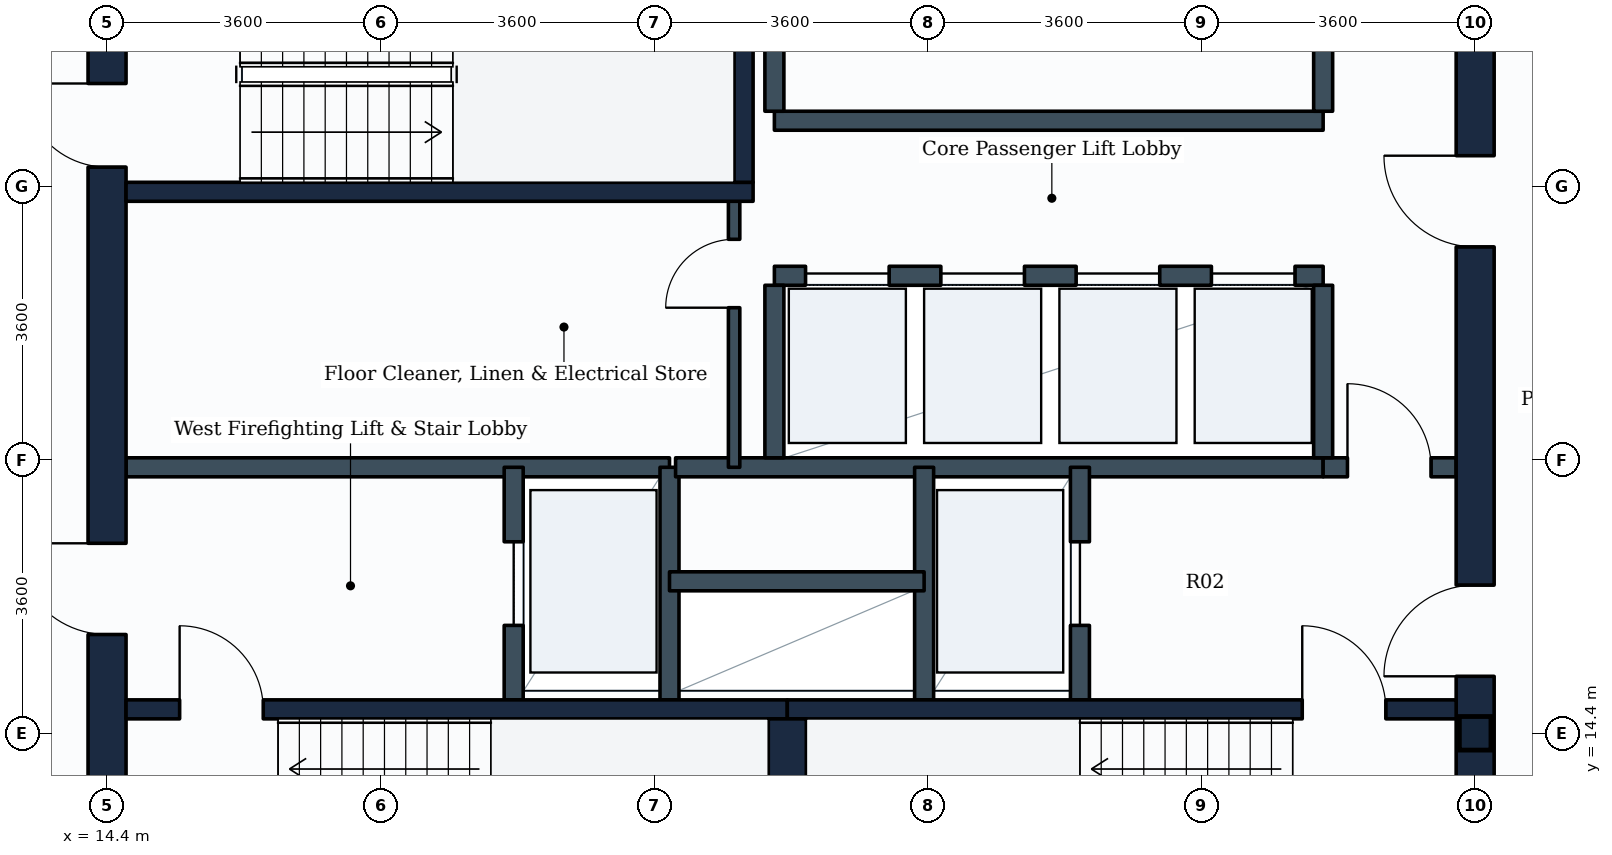
"""IFC4 building model, lengths in metres.
Left out: names, types, materials, properties, quantities, classifications, styles, units other than length and angle.
Written with IfcOpenShell. Run it as: python <this file> out.ifc"""

import sys

from ifc_helpers import new_model, si_unit, direction, frame, frame_2d, origin, origin_2d, place, context, subcontext, project, spatial, rectangle, i_section, extrude, element, fill, save


model = new_model("IFC4")
c1 = context("Model", 3, precision=1e-05, world=origin(), true_north=direction((0.0, 1.0)))
c2 = subcontext(c1, "Body", "Model", "MODEL_VIEW")
j1 = project(units=[si_unit("LENGTHUNIT", "METRE"), si_unit("PLANEANGLEUNIT", "RADIAN")], contexts=[c1])
p1 = place(None, origin())
s1 = spatial("IfcSite", under=j1, at=p1, CompositionType="ELEMENT")
p2 = place(p1, origin())
s2 = spatial("IfcBuilding", under=s1, at=p2, CompositionType="ELEMENT")
p3 = place(p2, frame((0.0, 0.0, 205.2)))
s3 = spatial("IfcBuildingStorey", under=s2, at=p3, CompositionType="ELEMENT", Elevation=205.2)
p4 = place(p3, frame((32.4, 14.4, 0.0), z_axis=(0.0, 0.0, 1.0), x_axis=(1.0, 0.0, 0.0)))
e1 = element("IfcColumn", 1, at=p4, inside=s3, PredefinedType="COLUMN", context=c2, shape_type="SweptSolid", body=[
    extrude(i_section(OverallWidth=0.416, OverallDepth=0.442, WebThickness=0.025, FlangeThickness=0.041, FilletRadius=0.015, at=origin_2d()), origin(), (0.0, 0.0, 1.0), 3.8),
])
p5 = place(p3, frame((14.4, 10.8, 0.0), z_axis=(0.0, 0.0, 1.0), x_axis=(0.0, 1.0, 0.0)))
e2 = element("IfcWall", 2, at=p5, inside=s3, PredefinedType="SHEAR", context=c2, shape_type="SweptSolid", body=[
    extrude(rectangle(XDim=14.4, YDim=0.5, at=frame_2d((7.2, 0.0))), origin(), (0.0, 0.0, 1.0), 3.48),
])
p6 = place(p5, frame((11.05, 0.0, 0.0)))
e3 = element("IfcOpeningElement", 3, at=p6, cuts=e2, PredefinedType="OPENING", context=c2, shape_type="SweptSolid", body=[
    extrude(rectangle(XDim=1.1, YDim=2.1, at=frame_2d((0.55, 1.05))), frame((0.0, 0.26, 0.0), z_axis=(0.0, -1.0, 0.0), x_axis=(1.0, 0.0, 0.0)), (0.0, 0.0, 1.0), 0.52),
])
p7 = place(p5, frame((4.9, 0.0, 0.0)))
e4 = element("IfcOpeningElement", 4, at=p7, cuts=e2, PredefinedType="OPENING", context=c2, shape_type="SweptSolid", body=[
    extrude(rectangle(XDim=1.2, YDim=2.1, at=frame_2d((0.6, 1.05))), frame((0.0, 0.26, 0.0), z_axis=(0.0, -1.0, 0.0), x_axis=(1.0, 0.0, 0.0)), (0.0, 0.0, 1.0), 0.52),
])
p8 = place(p3, frame((32.4, 10.8, 0.0), z_axis=(0.0, 0.0, 1.0), x_axis=(0.0, 1.0, 0.0)))
e5 = element("IfcWall", 5, at=p8, inside=s3, PredefinedType="SHEAR", context=c2, shape_type="SweptSolid", body=[
    extrude(rectangle(XDim=14.4, YDim=0.5, at=frame_2d((7.2, 0.0))), origin(), (0.0, 0.0, 1.0), 3.48),
])
p9 = place(p8, frame((4.35, 0.0, 0.0)))
e6 = element("IfcOpeningElement", 6, at=p9, cuts=e5, PredefinedType="OPENING", context=c2, shape_type="SweptSolid", body=[
    extrude(rectangle(XDim=1.2, YDim=2.1, at=frame_2d((0.6, 1.05))), frame((0.0, 0.26, 0.0), z_axis=(0.0, -1.0, 0.0), x_axis=(1.0, 0.0, 0.0)), (0.0, 0.0, 1.0), 0.52),
])
p10 = place(p8, frame((10.0, 0.0, 0.0)))
e7 = element("IfcOpeningElement", 7, at=p10, cuts=e5, PredefinedType="OPENING", context=c2, shape_type="SweptSolid", body=[
    extrude(rectangle(XDim=1.2, YDim=2.1, at=frame_2d((0.6, 1.05))), frame((0.0, 0.26, 0.0), z_axis=(0.0, -1.0, 0.0), x_axis=(1.0, 0.0, 0.0)), (0.0, 0.0, 1.0), 0.52),
])
p11 = place(p3, frame((14.65, 14.715, 0.0), z_axis=(0.0, 0.0, 1.0), x_axis=(1.0, 0.0, 0.0)))
e8 = element("IfcWall", 8, at=p11, inside=s3, PredefinedType="SHEAR", context=c2, shape_type="SweptSolid", body=[
    extrude(rectangle(XDim=8.7, YDim=0.25, at=frame_2d((4.35, 0.0))), origin(), (0.0, 0.0, 1.0), 3.48),
])
p12 = place(p11, frame((0.705, 0.0, 0.0)))
e9 = element("IfcOpeningElement", 9, at=p12, cuts=e8, PredefinedType="OPENING", context=c2, shape_type="SweptSolid", body=[
    extrude(rectangle(XDim=1.1, YDim=2.1, at=frame_2d((0.55, 1.05))), frame((0.0, 0.135, 0.0), z_axis=(0.0, -1.0, 0.0), x_axis=(1.0, 0.0, 0.0)), (0.0, 0.0, 1.0), 0.27),
])
p13 = place(p3, frame((23.35, 14.715, 0.0), z_axis=(0.0, 0.0, 1.0), x_axis=(1.0, 0.0, 0.0)))
e10 = element("IfcWall", 10, at=p13, inside=s3, PredefinedType="SHEAR", context=c2, shape_type="SweptSolid", body=[
    extrude(rectangle(XDim=8.8, YDim=0.25, at=frame_2d((4.4, 0.0))), origin(), (0.0, 0.0, 1.0), 3.48),
])
p14 = place(p13, frame((6.775, 0.0, 0.0)))
e11 = element("IfcOpeningElement", 11, at=p14, cuts=e10, PredefinedType="OPENING", context=c2, shape_type="SweptSolid", body=[
    extrude(rectangle(XDim=1.1, YDim=2.1, at=frame_2d((0.55, 1.05))), frame((0.0, 0.135, 0.0), z_axis=(0.0, -1.0, 0.0), x_axis=(1.0, 0.0, 0.0)), (0.0, 0.0, 1.0), 0.27),
])
p15 = place(p3, frame((23.35, 11.75, 0.0), z_axis=(0.0, 0.0, 1.0), x_axis=(0.0, 1.0, 0.0)))
e12 = element("IfcWall", 12, at=p15, inside=s3, PredefinedType="SHEAR", context=c2, shape_type="SweptSolid", body=[
    extrude(rectangle(XDim=2.84, YDim=0.5, at=frame_2d((1.42, 0.0))), origin(), (0.0, 0.0, 1.0), 3.48),
])
p16 = place(p3, frame((14.65, 21.525, 0.0), z_axis=(0.0, 0.0, 1.0), x_axis=(1.0, 0.0, 0.0)))
e13 = element("IfcWall", 13, at=p16, inside=s3, PredefinedType="SHEAR", context=c2, shape_type="SweptSolid", body=[
    extrude(rectangle(XDim=8.25, YDim=0.25, at=frame_2d((4.125, 0.0))), origin(), (0.0, 0.0, 1.0), 3.48),
])
p17 = place(p3, frame((22.775, 21.65, 0.0), z_axis=(0.0, 0.0, 1.0), x_axis=(0.0, 1.0, 0.0)))
e14 = element("IfcWall", 14, at=p17, inside=s3, PredefinedType="SHEAR", context=c2, shape_type="SweptSolid", body=[
    extrude(rectangle(XDim=2.84, YDim=0.25, at=frame_2d((1.42, 0.0))), origin(), (0.0, 0.0, 1.0), 3.48),
])
p18 = place(p3, frame((14.65, 17.9, 0.0), z_axis=(0.0, 0.0, 1.0), x_axis=(1.0, 0.0, 0.0)))
e15 = element("IfcWall", 15, at=p18, inside=s3, PredefinedType="PARTITIONING", context=c2, shape_type="SweptSolid", body=[
    extrude(rectangle(XDim=7.15, YDim=0.25, at=frame_2d((3.575, 0.0))), origin(), (0.0, 0.0, 1.0), 3.465),
])
p19 = place(p3, frame((19.75, 14.84, 0.0), z_axis=(0.0, 0.0, 1.0), x_axis=(0.0, 1.0, 0.0)))
e16 = element("IfcWall", 16, at=p19, inside=s3, PredefinedType="PARTITIONING", context=c2, shape_type="SweptSolid", body=[
    extrude(rectangle(XDim=3.06, YDim=0.25, at=frame_2d((1.53, 0.0))), origin(), (0.0, 0.0, 1.0), 3.465),
])
p20 = place(p19, frame((0.98, 0.0, 0.0)))
e17 = element("IfcOpeningElement", 17, at=p20, cuts=e16, PredefinedType="OPENING", context=c2, shape_type="SweptSolid", body=[
    extrude(rectangle(XDim=1.1, YDim=2.1, at=frame_2d((0.55, 1.05))), frame((0.0, 0.135, 0.0), z_axis=(0.0, -1.0, 0.0), x_axis=(1.0, 0.0, 0.0)), (0.0, 0.0, 1.0), 0.27),
])
p21 = place(p3, frame((21.8, 14.84, 0.0), z_axis=(0.0, 0.0, 1.0), x_axis=(0.0, 1.0, 0.0)))
e18 = element("IfcWall", 18, at=p21, inside=s3, PredefinedType="PARTITIONING", context=c2, shape_type="SweptSolid", body=[
    extrude(rectangle(XDim=3.06, YDim=0.25, at=frame_2d((1.53, 0.0))), origin(), (0.0, 0.0, 1.0), 3.465),
])
p22 = place(p3, frame((21.88, 17.9, 0.0), z_axis=(0.0, 0.0, 1.0), x_axis=(1.0, 0.0, 0.0)))
e19 = element("IfcWall", 19, at=p22, inside=s3, PredefinedType="PARTITIONING", context=c2, shape_type="SweptSolid", body=[
    extrude(rectangle(XDim=8.52, YDim=0.25, at=frame_2d((4.26, 0.0))), origin(), (0.0, 0.0, 1.0), 3.465),
])
p23 = place(p3, frame((30.4, 17.9, 0.0), z_axis=(0.0, 0.0, 1.0), x_axis=(1.0, 0.0, 0.0)))
e20 = element("IfcWall", 20, at=p23, inside=s3, PredefinedType="PARTITIONING", context=c2, shape_type="SweptSolid", body=[
    extrude(rectangle(XDim=1.75, YDim=0.25, at=frame_2d((0.875, 0.0))), origin(), (0.0, 0.0, 1.0), 3.465),
])
p24 = place(p23, frame((0.32, 0.0, 0.0)))
e21 = element("IfcOpeningElement", 21, at=p24, cuts=e20, PredefinedType="OPENING", context=c2, shape_type="SweptSolid", body=[
    extrude(rectangle(XDim=1.1, YDim=2.1, at=frame_2d((0.55, 1.05))), frame((0.0, 0.135, 0.0), z_axis=(0.0, -1.0, 0.0), x_axis=(1.0, 0.0, 0.0)), (0.0, 0.0, 1.0), 0.27),
])
p25 = place(p3, frame((25.15, 14.84, 0.0), z_axis=(0.0, 0.0, 1.0), x_axis=(0.0, 1.0, 0.0)))
e22 = element("IfcWall", 22, at=p25, inside=s3, PredefinedType="PARTITIONING", context=c2, shape_type="SweptSolid", body=[
    extrude(rectangle(XDim=3.06, YDim=0.25, at=frame_2d((1.53, 0.0))), origin(), (0.0, 0.0, 1.0), 3.465),
])
p26 = place(p3, frame((27.2, 14.84, 0.0), z_axis=(0.0, 0.0, 1.0), x_axis=(0.0, 1.0, 0.0)))
e23 = element("IfcWall", 23, at=p26, inside=s3, PredefinedType="PARTITIONING", context=c2, shape_type="SweptSolid", body=[
    extrude(rectangle(XDim=3.06, YDim=0.25, at=frame_2d((1.53, 0.0))), origin(), (0.0, 0.0, 1.0), 3.465),
])
p27 = place(p26, frame((0.98, 0.0, 0.0)))
e24 = element("IfcOpeningElement", 24, at=p27, cuts=e23, PredefinedType="OPENING", context=c2, shape_type="SweptSolid", body=[
    extrude(rectangle(XDim=1.1, YDim=2.1, at=frame_2d((0.55, 1.05))), frame((0.0, 0.135, 0.0), z_axis=(0.0, -1.0, 0.0), x_axis=(1.0, 0.0, 0.0)), (0.0, 0.0, 1.0), 0.27),
])
p28 = place(p3, frame((21.8, 16.4, 0.0), z_axis=(0.0, 0.0, 1.0), x_axis=(1.0, 0.0, 0.0)))
e25 = element("IfcWall", 25, at=p28, inside=s3, PredefinedType="PARTITIONING", context=c2, shape_type="SweptSolid", body=[
    extrude(rectangle(XDim=3.35, YDim=0.25, at=frame_2d((1.675, 0.0))), origin(), (0.0, 0.0, 1.0), 3.465),
])
p29 = place(p3, frame((23.18, 20.42, 0.0), z_axis=(0.0, 0.0, 1.0), x_axis=(1.0, 0.0, 0.0)))
e26 = element("IfcWall", 26, at=p29, inside=s3, PredefinedType="PARTITIONING", context=c2, shape_type="SweptSolid", body=[
    extrude(rectangle(XDim=7.22, YDim=0.25, at=frame_2d((3.61, 0.0))), origin(), (0.0, 0.0, 1.0), 3.465),
])
p30 = place(p29, frame((0.41, 0.0, 0.0)))
e27 = element("IfcOpeningElement", 27, at=p30, cuts=e26, PredefinedType="OPENING", context=c2, shape_type="SweptSolid", body=[
    extrude(rectangle(XDim=1.1, YDim=2.1, at=frame_2d((0.55, 1.05))), frame((0.0, 0.135, 0.0), z_axis=(0.0, -1.0, 0.0), x_axis=(1.0, 0.0, 0.0)), (0.0, 0.0, 1.0), 0.27),
])
p31 = place(p29, frame((2.19, 0.0, 0.0)))
e28 = element("IfcOpeningElement", 28, at=p31, cuts=e26, PredefinedType="OPENING", context=c2, shape_type="SweptSolid", body=[
    extrude(rectangle(XDim=1.1, YDim=2.1, at=frame_2d((0.55, 1.05))), frame((0.0, 0.135, 0.0), z_axis=(0.0, -1.0, 0.0), x_axis=(1.0, 0.0, 0.0)), (0.0, 0.0, 1.0), 0.27),
])
p32 = place(p29, frame((3.97, 0.0, 0.0)))
e29 = element("IfcOpeningElement", 29, at=p32, cuts=e26, PredefinedType="OPENING", context=c2, shape_type="SweptSolid", body=[
    extrude(rectangle(XDim=1.1, YDim=2.1, at=frame_2d((0.55, 1.05))), frame((0.0, 0.135, 0.0), z_axis=(0.0, -1.0, 0.0), x_axis=(1.0, 0.0, 0.0)), (0.0, 0.0, 1.0), 0.27),
])
p33 = place(p29, frame((5.75, 0.0, 0.0)))
e30 = element("IfcOpeningElement", 30, at=p33, cuts=e26, PredefinedType="OPENING", context=c2, shape_type="SweptSolid", body=[
    extrude(rectangle(XDim=1.1, YDim=2.1, at=frame_2d((0.55, 1.05))), frame((0.0, 0.135, 0.0), z_axis=(0.0, -1.0, 0.0), x_axis=(1.0, 0.0, 0.0)), (0.0, 0.0, 1.0), 0.27),
])
for number, where, z_axis, x_axis in (
    (31, (23.18, 18.025, 0.0), (0.0, 0.0, 1.0), (0.0, 1.0, 0.0)),
    (32, (30.4, 18.025, 0.0), (0.0, 0.0, 1.0), (0.0, 1.0, 0.0)),
):
    element("IfcWall", number, at=place(p3, frame(where, z_axis=z_axis, x_axis=x_axis)), inside=s3, PredefinedType="PARTITIONING", context=c2, shape_type="SweptSolid", body=[
        extrude(rectangle(XDim=2.27, YDim=0.25, at=frame_2d((1.135, 0.0))), origin(), (0.0, 0.0, 1.0), 3.465),
    ])
p34 = place(p3, frame((23.18, 22.46, 0.0), z_axis=(0.0, 0.0, 1.0), x_axis=(1.0, 0.0, 0.0)))
e33 = element("IfcWall", 33, at=p34, inside=s3, PredefinedType="PARTITIONING", context=c2, shape_type="SweptSolid", body=[
    extrude(rectangle(XDim=7.22, YDim=0.25, at=frame_2d((3.61, 0.0))), origin(), (0.0, 0.0, 1.0), 3.465),
])
for number, where, z_axis, x_axis in (
    (34, (23.18, 22.585, 0.0), (0.0, 0.0, 1.0), (0.0, 1.0, 0.0)),
    (35, (30.4, 22.585, 0.0), (0.0, 0.0, 1.0), (0.0, 1.0, 0.0)),
):
    element("IfcWall", number, at=place(p3, frame(where, z_axis=z_axis, x_axis=x_axis)), inside=s3, PredefinedType="PARTITIONING", context=c2, shape_type="SweptSolid", body=[
        extrude(rectangle(XDim=2.315, YDim=0.25, at=frame_2d((1.157, 0.0))), origin(), (0.0, 0.0, 1.0), 3.465),
    ])
p35 = place(p3, frame((22.65, 17.9, 0.0), z_axis=(0.0, 0.0, 1.0), x_axis=(0.0, 1.0, 0.0)))
e36 = element("IfcWall", 36, at=p35, inside=s3, PredefinedType="PARTITIONING", context=c2, shape_type="SweptSolid", body=[
    extrude(rectangle(XDim=3.625, YDim=0.15, at=frame_2d((1.812, 0.0))), origin(), (0.0, 0.0, 1.0), 3.465),
])
p36 = place(p35, frame((2.1, 0.0, 0.0)))
e37 = element("IfcOpeningElement", 37, at=p36, cuts=e36, PredefinedType="OPENING", context=c2, shape_type="SweptSolid", body=[
    extrude(rectangle(XDim=0.9, YDim=2.1, at=frame_2d((0.45, 1.05))), frame((0.0, 0.085, 0.0), z_axis=(0.0, -1.0, 0.0), x_axis=(1.0, 0.0, 0.0)), (0.0, 0.0, 1.0), 0.17),
])
p37 = place(p12, origin())
e38 = element("IfcDoor", 38, at=p37, inside=s3, OperationType="SINGLE_SWING_LEFT", PredefinedType="DOOR", context=c2, shape_type="SweptSolid", body=[
    extrude(rectangle(XDim=1.1, YDim=2.1, at=frame_2d((0.55, 1.05))), frame((0.0, 0.025, 0.0), z_axis=(0.0, -1.0, 0.0), x_axis=(1.0, 0.0, 0.0)), (0.0, 0.0, 1.0), 0.05),
])
fill(e9, e38)
p38 = place(p14, origin())
e39 = element("IfcDoor", 39, at=p38, inside=s3, OperationType="SINGLE_SWING_LEFT", PredefinedType="DOOR", context=c2, shape_type="SweptSolid", body=[
    extrude(rectangle(XDim=1.1, YDim=2.1, at=frame_2d((0.55, 1.05))), frame((0.0, 0.025, 0.0), z_axis=(0.0, -1.0, 0.0), x_axis=(1.0, 0.0, 0.0)), (0.0, 0.0, 1.0), 0.05),
])
fill(e11, e39)
p39 = place(p6, origin())
e40 = element("IfcDoor", 40, at=p39, inside=s3, OperationType="SINGLE_SWING_RIGHT", PredefinedType="DOOR", context=c2, shape_type="SweptSolid", body=[
    extrude(rectangle(XDim=1.1, YDim=2.1, at=frame_2d((0.55, 1.05))), frame((0.0, 0.025, 0.0), z_axis=(0.0, -1.0, 0.0), x_axis=(1.0, 0.0, 0.0)), (0.0, 0.0, 1.0), 0.05),
])
fill(e3, e40)
p40 = place(p20, origin())
e41 = element("IfcDoor", 41, at=p40, inside=s3, OperationType="SLIDING_TO_LEFT", PredefinedType="DOOR", context=c2, shape_type="SweptSolid", body=[
    extrude(rectangle(XDim=1.1, YDim=2.1, at=frame_2d((0.55, 1.05))), frame((0.0, 0.025, 0.0), z_axis=(0.0, -1.0, 0.0), x_axis=(1.0, 0.0, 0.0)), (0.0, 0.0, 1.0), 0.05),
])
fill(e17, e41)
p41 = place(p27, origin())
e42 = element("IfcDoor", 42, at=p41, inside=s3, OperationType="SLIDING_TO_LEFT", PredefinedType="DOOR", context=c2, shape_type="SweptSolid", body=[
    extrude(rectangle(XDim=1.1, YDim=2.1, at=frame_2d((0.55, 1.05))), frame((0.0, 0.025, 0.0), z_axis=(0.0, -1.0, 0.0), x_axis=(1.0, 0.0, 0.0)), (0.0, 0.0, 1.0), 0.05),
])
fill(e24, e42)
p42 = place(p7, origin())
e43 = element("IfcDoor", 43, at=p42, inside=s3, OperationType="SINGLE_SWING_RIGHT", PredefinedType="DOOR", context=c2, shape_type="SweptSolid", body=[
    extrude(rectangle(XDim=1.2, YDim=2.1, at=frame_2d((0.6, 1.05))), frame((0.0, 0.025, 0.0), z_axis=(0.0, -1.0, 0.0), x_axis=(1.0, 0.0, 0.0)), (0.0, 0.0, 1.0), 0.05),
])
fill(e4, e43)
p43 = place(p9, origin())
e44 = element("IfcDoor", 44, at=p43, inside=s3, OperationType="SINGLE_SWING_LEFT", PredefinedType="DOOR", context=c2, shape_type="SweptSolid", body=[
    extrude(rectangle(XDim=1.2, YDim=2.1, at=frame_2d((0.6, 1.05))), frame((0.0, 0.025, 0.0), z_axis=(0.0, -1.0, 0.0), x_axis=(1.0, 0.0, 0.0)), (0.0, 0.0, 1.0), 0.05),
])
fill(e6, e44)
p44 = place(p24, origin())
e45 = element("IfcDoor", 45, at=p44, inside=s3, OperationType="SINGLE_SWING_LEFT", PredefinedType="DOOR", context=c2, shape_type="SweptSolid", body=[
    extrude(rectangle(XDim=1.1, YDim=2.1, at=frame_2d((0.55, 1.05))), frame((0.0, 0.025, 0.0), z_axis=(0.0, -1.0, 0.0), x_axis=(1.0, 0.0, 0.0)), (0.0, 0.0, 1.0), 0.05),
])
fill(e21, e45)
p45 = place(p30, origin())
e46 = element("IfcDoor", 46, at=p45, inside=s3, OperationType="SLIDING_TO_LEFT", PredefinedType="DOOR", context=c2, shape_type="SweptSolid", body=[
    extrude(rectangle(XDim=1.1, YDim=2.1, at=frame_2d((0.55, 1.05))), frame((0.0, 0.025, 0.0), z_axis=(0.0, -1.0, 0.0), x_axis=(1.0, 0.0, 0.0)), (0.0, 0.0, 1.0), 0.05),
])
fill(e27, e46)
p46 = place(p31, origin())
e47 = element("IfcDoor", 47, at=p46, inside=s3, OperationType="SLIDING_TO_LEFT", PredefinedType="DOOR", context=c2, shape_type="SweptSolid", body=[
    extrude(rectangle(XDim=1.1, YDim=2.1, at=frame_2d((0.55, 1.05))), frame((0.0, 0.025, 0.0), z_axis=(0.0, -1.0, 0.0), x_axis=(1.0, 0.0, 0.0)), (0.0, 0.0, 1.0), 0.05),
])
fill(e28, e47)
p47 = place(p32, origin())
e48 = element("IfcDoor", 48, at=p47, inside=s3, OperationType="SLIDING_TO_LEFT", PredefinedType="DOOR", context=c2, shape_type="SweptSolid", body=[
    extrude(rectangle(XDim=1.1, YDim=2.1, at=frame_2d((0.55, 1.05))), frame((0.0, 0.025, 0.0), z_axis=(0.0, -1.0, 0.0), x_axis=(1.0, 0.0, 0.0)), (0.0, 0.0, 1.0), 0.05),
])
fill(e29, e48)
p48 = place(p33, origin())
e49 = element("IfcDoor", 49, at=p48, inside=s3, OperationType="SLIDING_TO_LEFT", PredefinedType="DOOR", context=c2, shape_type="SweptSolid", body=[
    extrude(rectangle(XDim=1.1, YDim=2.1, at=frame_2d((0.55, 1.05))), frame((0.0, 0.025, 0.0), z_axis=(0.0, -1.0, 0.0), x_axis=(1.0, 0.0, 0.0)), (0.0, 0.0, 1.0), 0.05),
])
fill(e30, e49)
p49 = place(p10, origin())
e50 = element("IfcDoor", 50, at=p49, inside=s3, OperationType="SINGLE_SWING_RIGHT", PredefinedType="DOOR", context=c2, shape_type="SweptSolid", body=[
    extrude(rectangle(XDim=1.2, YDim=2.1, at=frame_2d((0.6, 1.05))), frame((0.0, 0.025, 0.0), z_axis=(0.0, -1.0, 0.0), x_axis=(1.0, 0.0, 0.0)), (0.0, 0.0, 1.0), 0.05),
])
fill(e7, e50)
p50 = place(p36, origin())
e51 = element("IfcDoor", 51, at=p50, inside=s3, OperationType="SINGLE_SWING_LEFT", PredefinedType="DOOR", context=c2, shape_type="SweptSolid", body=[
    extrude(rectangle(XDim=0.9, YDim=2.1, at=frame_2d((0.45, 1.05))), frame((0.0, 0.025, 0.0), z_axis=(0.0, -1.0, 0.0), x_axis=(1.0, 0.0, 0.0)), (0.0, 0.0, 1.0), 0.05),
])
fill(e37, e51)
save(model, sys.argv[1])
